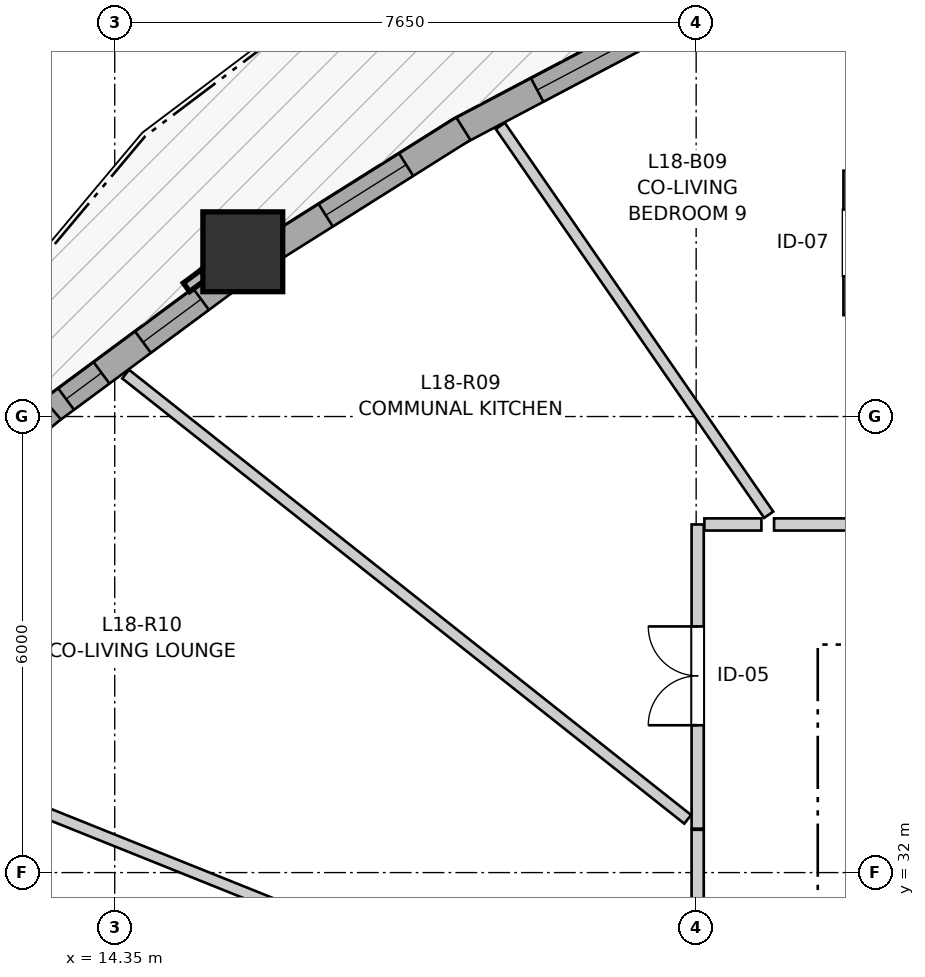
"""IFC4 building model, lengths in metres.
Left out: names, types, materials, properties, quantities, classifications, styles, units other than length and angle.
Written with IfcOpenShell. Run it as: python <this file> out.ifc"""

import sys

from ifc_helpers import new_model, si_unit, direction, frame, frame_2d, origin, origin_2d, place, context, subcontext, project, spatial, rectangle, extrude, source, transform, mapped, element, fill, save


model = new_model("IFC4")
c1 = context("Model", 3, precision=1e-05, world=origin(), true_north=direction((0.0, 1.0)))
c2 = subcontext(c1, "Body", "Model", "MODEL_VIEW")
j1 = project(units=[si_unit("LENGTHUNIT", "METRE"), si_unit("PLANEANGLEUNIT", "RADIAN")], contexts=[c1])
p1 = place(None, origin())
s1 = spatial("IfcSite", under=j1, at=p1, CompositionType="ELEMENT")
p2 = place(p1, origin())
s2 = spatial("IfcBuilding", under=s1, at=p2, CompositionType="ELEMENT")
p3 = place(p2, frame((0.0, 0.0, 62.2)))
s3 = spatial("IfcBuildingStorey", under=s2, at=p3, CompositionType="ELEMENT", Elevation=62.2)
m1 = source(origin(), c2, "Body", "SweptSolid", [
    extrude(rectangle(XDim=1.05, YDim=1.05, at=origin_2d()), origin(), (0.0, 0.0, 1.0), 2.9),
])
p4 = place(p3, frame((16.035, 40.168, 0.0), z_axis=(0.0, 0.0, 1.0), x_axis=(1.0, 0.0, 0.0)))
e1 = element("IfcColumn", 1, at=p4, inside=s3, PredefinedType="COLUMN", context=c2, shape_type="MappedRepresentation", body=[
    mapped(m1, transform((0.0, 0.0, 0.0), x_axis=(1.0, 0.0, 0.0), y_axis=(0.0, 1.0, 0.0), z_axis=(0.0, 0.0, 1.0), scale=1.0)),
])
p5 = place(p3, frame((21.777, 43.281, 0.0), z_axis=(0.0, 0.0, 1.0), x_axis=(-0.884381357857, -0.466765052113, 0.0)))
e2 = element("IfcWall", 2, at=p5, inside=s3, PredefinedType="SOLIDWALL", context=c2, shape_type="SweptSolid", body=[
    extrude(rectangle(XDim=3.298, YDim=0.35, at=frame_2d((1.649, 0.0))), origin(), (0.0, 0.0, 1.0), 2.38),
])
p6 = place(p5, frame((0.713, 0.0, 0.82)))
e3 = element("IfcOpeningElement", 3, at=p6, cuts=e2, PredefinedType="OPENING", context=c2, shape_type="SweptSolid", body=[
    extrude(rectangle(XDim=1.4, YDim=1.35, at=frame_2d((0.7, 0.675))), frame((0.0, 0.185, 0.0), z_axis=(0.0, -1.0, 0.0), x_axis=(1.0, 0.0, 0.0)), (0.0, 0.0, 1.0), 0.37),
])
p7 = place(p3, frame((18.937, 41.787, 0.0), z_axis=(0.0, 0.0, 1.0), x_axis=(-0.84639489148, -0.532555807101, 0.0)))
e4 = element("IfcWall", 4, at=p7, inside=s3, PredefinedType="SOLIDWALL", context=c2, shape_type="SweptSolid", body=[
    extrude(rectangle(XDim=3.018, YDim=0.35, at=frame_2d((1.509, 0.0))), origin(), (0.0, 0.0, 1.0), 2.38),
])
p8 = place(p7, frame((0.889, 0.0, 0.82)))
e5 = element("IfcOpeningElement", 5, at=p8, cuts=e4, PredefinedType="OPENING", context=c2, shape_type="SweptSolid", body=[
    extrude(rectangle(XDim=1.25, YDim=1.35, at=frame_2d((0.625, 0.675))), frame((0.0, 0.185, 0.0), z_axis=(0.0, -1.0, 0.0), x_axis=(1.0, 0.0, 0.0)), (0.0, 0.0, 1.0), 0.37),
])
p9 = place(p3, frame((15.898, 39.849, 0.0), z_axis=(0.0, 0.0, 1.0), x_axis=(-0.803775013519, -0.594933380844, 0.0)))
e6 = element("IfcWall", 6, at=p9, inside=s3, PredefinedType="SOLIDWALL", context=c2, shape_type="SweptSolid", body=[
    extrude(rectangle(XDim=3.037, YDim=0.35, at=frame_2d((1.519, 0.0))), origin(), (0.0, 0.0, 1.0), 2.38),
])
p10 = place(p9, frame((0.513, 0.0, 0.82)))
e7 = element("IfcOpeningElement", 7, at=p10, cuts=e6, PredefinedType="OPENING", context=c2, shape_type="SweptSolid", body=[
    extrude(rectangle(XDim=0.95, YDim=1.35, at=frame_2d((0.475, 0.675))), frame((0.0, 0.185, 0.0), z_axis=(0.0, -1.0, 0.0), x_axis=(1.0, 0.0, 0.0)), (0.0, 0.0, 1.0), 0.37),
])
p11 = place(p9, frame((2.142, 0.0, 0.82)))
e8 = element("IfcOpeningElement", 8, at=p11, cuts=e6, PredefinedType="OPENING", context=c2, shape_type="SweptSolid", body=[
    extrude(rectangle(XDim=0.58, YDim=1.35, at=frame_2d((0.29, 0.675))), frame((0.0, 0.185, 0.0), z_axis=(0.0, -1.0, 0.0), x_axis=(1.0, 0.0, 0.0)), (0.0, 0.0, 1.0), 0.37),
])
p12 = place(p3, frame((13.526, 38.097, 0.0), z_axis=(0.0, 0.0, 1.0), x_axis=(-0.757460843483, -0.652880594435, 0.0)))
e9 = element("IfcWall", 9, at=p12, inside=s3, PredefinedType="SOLIDWALL", context=c2, shape_type="SweptSolid", body=[
    extrude(rectangle(XDim=3.355, YDim=0.35, at=frame_2d((1.677, 0.0))), origin(), (0.0, 0.0, 1.0), 2.38),
])
p13 = place(p12, frame((0.962, 0.0, 0.82)))
e10 = element("IfcOpeningElement", 10, at=p13, cuts=e9, PredefinedType="OPENING", context=c2, shape_type="SweptSolid", body=[
    extrude(rectangle(XDim=1.45, YDim=1.25, at=frame_2d((0.725, 0.625))), frame((0.0, 0.185, 0.0), z_axis=(0.0, -1.0, 0.0), x_axis=(1.0, 0.0, 0.0)), (0.0, 0.0, 1.0), 0.37),
])
p14 = place(p3, frame((23.025, 36.58, 0.0), z_axis=(0.0, 0.0, 1.0), x_axis=(1.0, 0.0, 0.0)))
e11 = element("IfcWall", 11, at=p14, inside=s3, PredefinedType="PARTITIONING", context=c2, shape_type="SweptSolid", body=[
    extrude(rectangle(XDim=4.152, YDim=0.16, at=frame_2d((2.076, 0.0))), origin(), (0.0, 0.0, 1.0), 2.508),
])
p15 = place(p14, frame((1.64, 0.0, 0.0)))
e12 = element("IfcOpeningElement", 12, at=p15, cuts=e11, PredefinedType="OPENING", context=c2, shape_type="SweptSolid", body=[
    extrude(rectangle(XDim=0.92, YDim=2.1, at=frame_2d((0.46, 1.05))), frame((0.0, 0.09, 0.0), z_axis=(0.0, -1.0, 0.0), x_axis=(1.0, 0.0, 0.0)), (0.0, 0.0, 1.0), 0.18),
])
p16 = place(p3, frame((22.02, 32.578, 0.0), z_axis=(0.0, 0.0, 1.0), x_axis=(0.0, 1.0, 0.0)))
e13 = element("IfcWall", 13, at=p16, inside=s3, PredefinedType="PARTITIONING", context=c2, shape_type="SweptSolid", body=[
    extrude(rectangle(XDim=4.002, YDim=0.16, at=frame_2d((2.001, 0.0))), origin(), (0.0, 0.0, 1.0), 2.9),
])
p17 = place(p16, frame((1.361, 0.0, 0.0)))
e14 = element("IfcOpeningElement", 14, at=p17, cuts=e13, PredefinedType="OPENING", context=c2, shape_type="SweptSolid", body=[
    extrude(rectangle(XDim=1.3, YDim=2.1, at=frame_2d((0.65, 1.05))), frame((0.0, 0.09, 0.0), z_axis=(0.0, -1.0, 0.0), x_axis=(1.0, 0.0, 0.0)), (0.0, 0.0, 1.0), 0.18),
])
p18 = place(p3, frame((22.02, 29.328, 0.0), z_axis=(0.0, 0.0, 1.0), x_axis=(0.0, 1.0, 0.0)))
e15 = element("IfcWall", 15, at=p18, inside=s3, PredefinedType="PARTITIONING", context=c2, shape_type="SweptSolid", body=[
    extrude(rectangle(XDim=3.235, YDim=0.16, at=frame_2d((1.618, 0.0))), origin(), (0.0, 0.0, 1.0), 2.9),
])
p19 = place(p18, frame((0.992, 0.0, 0.0)))
e16 = element("IfcOpeningElement", 16, at=p19, cuts=e15, PredefinedType="OPENING", context=c2, shape_type="SweptSolid", body=[
    extrude(rectangle(XDim=1.3, YDim=2.1, at=frame_2d((0.65, 1.05))), frame((0.0, 0.09, 0.0), z_axis=(0.0, -1.0, 0.0), x_axis=(1.0, 0.0, 0.0)), (0.0, 0.0, 1.0), 0.18),
])
p20 = place(p3, frame((24.003, 41.234, 0.0), z_axis=(0.0, 0.0, 1.0), x_axis=(0.0, -1.0, 0.0)))
e17 = element("IfcWall", 17, at=p20, inside=s3, PredefinedType="PARTITIONING", context=c2, shape_type="SweptSolid", body=[
    extrude(rectangle(XDim=1.9, YDim=0.13, at=frame_2d((0.95, 0.0))), origin(), (0.0, 0.0, 1.0), 2.9),
])
p21 = place(p20, frame((0.51, 0.0, 0.0)))
e18 = element("IfcOpeningElement", 18, at=p21, cuts=e17, PredefinedType="OPENING", context=c2, shape_type="SweptSolid", body=[
    extrude(rectangle(XDim=0.88, YDim=2.05, at=frame_2d((0.44, 1.025))), frame((0.0, 0.075, 0.0), z_axis=(0.0, -1.0, 0.0), x_axis=(1.0, 0.0, 0.0)), (0.0, 0.0, 1.0), 0.15),
])
p22 = place(p3, frame((9.646, 34.312, 0.0), z_axis=(0.0, 0.0, 1.0), x_axis=(0.928010757454, -0.372553397581, 0.0)))
e19 = element("IfcWall", 19, at=p22, inside=s3, PredefinedType="PARTITIONING", context=c2, shape_type="SweptSolid", body=[
    extrude(rectangle(XDim=13.21, YDim=0.145, at=frame_2d((6.605, 0.0))), origin(), (0.0, 0.0, 1.0), 2.9),
])
p23 = place(p3, frame((14.494, 38.558, 0.0), z_axis=(0.0, 0.0, 1.0), x_axis=(0.783879440631, -0.620913055552, 0.0)))
e20 = element("IfcWall", 20, at=p23, inside=s3, PredefinedType="PARTITIONING", context=c2, shape_type="SweptSolid", body=[
    extrude(rectangle(XDim=9.434, YDim=0.145, at=frame_2d((4.717, 0.0))), origin(), (0.0, 0.0, 1.0), 2.9),
])
p24 = place(p3, frame((19.423, 41.823, 0.0), z_axis=(0.0, 0.0, 1.0), x_axis=(0.568159686118, -0.822918325881, 0.0)))
e21 = element("IfcWall", 21, at=p24, inside=s3, PredefinedType="PARTITIONING", context=c2, shape_type="SweptSolid", body=[
    extrude(rectangle(XDim=6.216, YDim=0.145, at=frame_2d((3.108, 0.0))), origin(), (0.0, 0.0, 1.0), 2.9),
])
p25 = place(p3, frame((22.108, 36.58, 0.0), z_axis=(0.0, 0.0, 1.0), x_axis=(1.0, 0.0, 0.0)))
e22 = element("IfcWall", 22, at=p25, inside=s3, PredefinedType="PARTITIONING", context=c2, shape_type="SweptSolid", body=[
    extrude(rectangle(XDim=0.751, YDim=0.16, at=frame_2d((0.375, 0.0))), origin(), (0.0, 0.0, 1.0), 2.9),
])
m2 = source(origin(), c2, "Body", "SweptSolid", [
    extrude(rectangle(XDim=1.4, YDim=1.35, at=frame_2d((0.7, 0.675))), frame((0.0, 0.03, 0.0), z_axis=(0.0, -1.0, 0.0), x_axis=(1.0, 0.0, 0.0)), (0.0, 0.0, 1.0), 0.06),
])
p26 = place(p6, origin())
e23 = element("IfcWindow", 23, at=p26, inside=s3, PartitioningType="SINGLE_PANEL", PredefinedType="WINDOW", context=c2, shape_type="MappedRepresentation", body=[
    mapped(m2, transform((0.0, 0.0, 0.0), x_axis=(1.0, 0.0, 0.0), y_axis=(0.0, 1.0, 0.0), z_axis=(0.0, 0.0, 1.0), scale=1.0)),
])
fill(e3, e23)
m3 = source(origin(), c2, "Body", "SweptSolid", [
    extrude(rectangle(XDim=1.25, YDim=1.35, at=frame_2d((0.625, 0.675))), frame((0.0, 0.03, 0.0), z_axis=(0.0, -1.0, 0.0), x_axis=(1.0, 0.0, 0.0)), (0.0, 0.0, 1.0), 0.06),
])
p27 = place(p8, origin())
e24 = element("IfcWindow", 24, at=p27, inside=s3, PartitioningType="SINGLE_PANEL", PredefinedType="WINDOW", context=c2, shape_type="MappedRepresentation", body=[
    mapped(m3, transform((0.0, 0.0, 0.0), x_axis=(1.0, 0.0, 0.0), y_axis=(0.0, 1.0, 0.0), z_axis=(0.0, 0.0, 1.0), scale=1.0)),
])
fill(e5, e24)
m4 = source(origin(), c2, "Body", "SweptSolid", [
    extrude(rectangle(XDim=0.95, YDim=1.35, at=frame_2d((0.475, 0.675))), frame((0.0, 0.03, 0.0), z_axis=(0.0, -1.0, 0.0), x_axis=(1.0, 0.0, 0.0)), (0.0, 0.0, 1.0), 0.06),
])
p28 = place(p10, origin())
e25 = element("IfcWindow", 25, at=p28, inside=s3, PartitioningType="SINGLE_PANEL", PredefinedType="WINDOW", context=c2, shape_type="MappedRepresentation", body=[
    mapped(m4, transform((0.0, 0.0, 0.0), x_axis=(1.0, 0.0, 0.0), y_axis=(0.0, 1.0, 0.0), z_axis=(0.0, 0.0, 1.0), scale=1.0)),
])
fill(e7, e25)
m5 = source(origin(), c2, "Body", "SweptSolid", [
    extrude(rectangle(XDim=0.58, YDim=1.35, at=frame_2d((0.29, 0.675))), frame((0.0, 0.03, 0.0), z_axis=(0.0, -1.0, 0.0), x_axis=(1.0, 0.0, 0.0)), (0.0, 0.0, 1.0), 0.06),
])
p29 = place(p11, origin())
e26 = element("IfcWindow", 26, at=p29, inside=s3, PartitioningType="SINGLE_PANEL", PredefinedType="WINDOW", context=c2, shape_type="MappedRepresentation", body=[
    mapped(m5, transform((0.0, 0.0, 0.0), x_axis=(1.0, 0.0, 0.0), y_axis=(0.0, 1.0, 0.0), z_axis=(0.0, 0.0, 1.0), scale=1.0)),
])
fill(e8, e26)
m6 = source(origin(), c2, "Body", "SweptSolid", [
    extrude(rectangle(XDim=1.3, YDim=2.1, at=frame_2d((0.65, 1.05))), frame((0.0, 0.025, 0.0), z_axis=(0.0, -1.0, 0.0), x_axis=(1.0, 0.0, 0.0)), (0.0, 0.0, 1.0), 0.05),
])
p30 = place(p17, origin())
e27 = element("IfcDoor", 27, at=p30, inside=s3, OperationType="DOUBLE_DOOR_SINGLE_SWING", PredefinedType="DOOR", context=c2, shape_type="MappedRepresentation", body=[
    mapped(m6, transform((0.0, 0.0, 0.0), x_axis=(1.0, 0.0, 0.0), y_axis=(0.0, 1.0, 0.0), z_axis=(0.0, 0.0, 1.0), scale=1.0)),
])
fill(e14, e27)
save(model, sys.argv[1])
